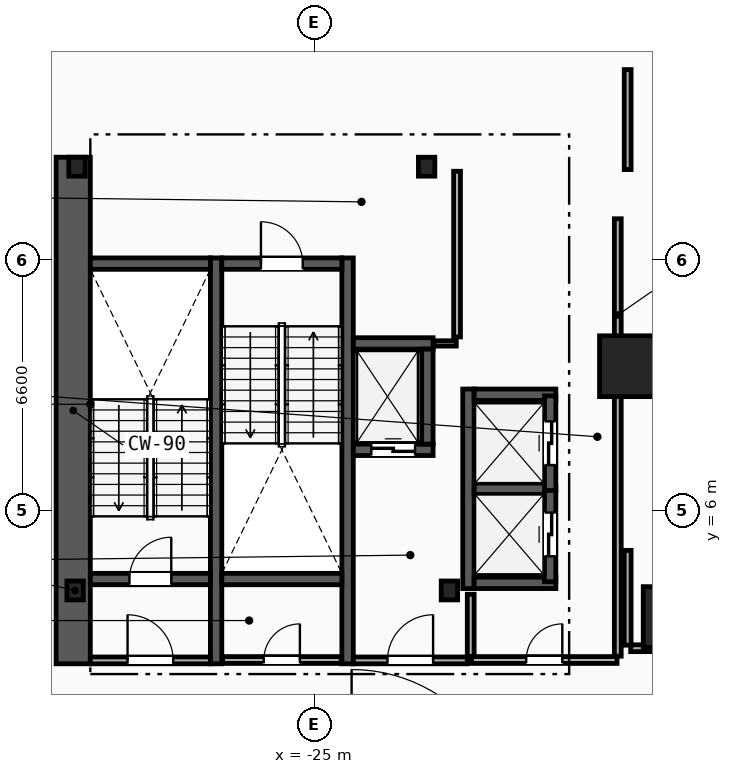
"""IFC4 building model, lengths in metres.
Left out: names, types, materials, properties, quantities, classifications, styles, units other than length and angle.
Written with IfcOpenShell. Run it as: python <this file> out.ifc"""

import sys

from ifc_helpers import new_model, si_unit, direction, frame, frame_2d, origin, origin_2d, place, context, subcontext, project, spatial, rectangle, i_section, extrude, element, fill, save


model = new_model("IFC4")
c1 = context("Model", 3, precision=1e-05, world=origin(), true_north=direction((0.0, 1.0)))
c2 = subcontext(c1, "Body", "Model", "MODEL_VIEW")
j1 = project(units=[si_unit("LENGTHUNIT", "METRE"), si_unit("PLANEANGLEUNIT", "RADIAN")], contexts=[c1])
p1 = place(None, origin())
s1 = spatial("IfcSite", under=j1, at=p1, CompositionType="ELEMENT")
p2 = place(p1, origin())
s2 = spatial("IfcBuilding", under=s1, at=p2, CompositionType="ELEMENT")
p3 = place(p2, frame((0.0, 0.0, -4.5)))
s3 = spatial("IfcBuildingStorey", under=s2, at=p3, CompositionType="ELEMENT", Elevation=-4.5)
for number, where, z_axis, x_axis in (
    (1, (-31.3, 3.9, 0.0), (0.0, 0.0, 1.0), (1.0, 0.0, 0.0)),
    (2, (-21.45, 3.9, 0.0), (0.0, 0.0, 1.0), (1.0, 0.0, 0.0)),
    (3, (-22.05, 15.05, 0.0), (0.0, 0.0, 1.0), (1.0, 0.0, 0.0)),
    (4, (-31.25, 15.05, 0.0), (0.0, 0.0, 1.0), (1.0, 0.0, 0.0)),
):
    element("IfcColumn", number, at=place(p3, frame(where, z_axis=z_axis, x_axis=x_axis)), inside=s3, PredefinedType="COLUMN", context=c2, shape_type="SweptSolid", body=[
        extrude(i_section(OverallWidth=0.432, OverallDepth=0.498, WebThickness=0.056, FlangeThickness=0.089, FilletRadius=0.018, at=origin_2d()), origin(), (0.0, 0.0, 1.0), 4.5),
    ])
for number, where, z_axis, x_axis in (
    (5, (-15.55, 3.2, 0.0), (0.0, 0.0, 1.0), (1.0, 0.0, 0.0)),
    (6, (-16.7, 9.8, 0.0), (0.0, 0.0, 1.0), (1.0, 0.0, 0.0)),
):
    element("IfcColumn", number, at=place(p3, frame(where, z_axis=z_axis, x_axis=x_axis)), inside=s3, PredefinedType="COLUMN", context=c2, shape_type="SweptSolid", body=[
        extrude(rectangle(XDim=1.6, YDim=1.6, at=origin_2d()), origin(), (0.0, 0.0, 1.0), 4.5),
    ])
p4 = place(p3, frame((-31.35, 1.97, 0.0), z_axis=(0.0, 0.0, 1.0), x_axis=(0.0, 1.0, 0.0)))
e7 = element("IfcWall", 7, at=p4, inside=s3, PredefinedType="SHEAR", context=c2, shape_type="SweptSolid", body=[
    extrude(rectangle(XDim=13.33, YDim=0.9, at=frame_2d((6.665, 0.0))), origin(), (0.0, 0.0, 1.0), 4.15),
])
for number, where, z_axis, x_axis in (
    (8, (-27.59, 1.97, 0.0), (0.0, 0.0, 1.0), (0.0, 1.0, 0.0)),
    (9, (-24.13, 1.97, 0.0), (0.0, 0.0, 1.0), (0.0, 1.0, 0.0)),
):
    element("IfcWall", number, at=place(p3, frame(where, z_axis=z_axis, x_axis=x_axis)), inside=s3, PredefinedType="SHEAR", context=c2, shape_type="SweptSolid", body=[
        extrude(rectangle(XDim=10.68, YDim=0.3, at=frame_2d((5.34, 0.0))), origin(), (0.0, 0.0, 1.0), 4.15),
    ])
p5 = place(p3, frame((-30.9, 4.2, 0.0), z_axis=(0.0, 0.0, 1.0), x_axis=(1.0, 0.0, 0.0)))
e10 = element("IfcWall", 10, at=p5, inside=s3, PredefinedType="SHEAR", context=c2, shape_type="SweptSolid", body=[
    extrude(rectangle(XDim=3.16, YDim=0.3, at=frame_2d((1.58, 0.0))), origin(), (0.0, 0.0, 1.0), 4.15),
])
p6 = place(p5, frame((1.03, 0.0, 0.0)))
e11 = element("IfcOpeningElement", 11, at=p6, cuts=e10, PredefinedType="OPENING", context=c2, shape_type="SweptSolid", body=[
    extrude(rectangle(XDim=1.1, YDim=2.15, at=frame_2d((0.55, 1.075))), frame((0.0, 0.16, 0.0), z_axis=(0.0, -1.0, 0.0), x_axis=(1.0, 0.0, 0.0)), (0.0, 0.0, 1.0), 0.32),
])
p7 = place(p3, frame((-30.9, 12.5, 0.0), z_axis=(0.0, 0.0, 1.0), x_axis=(1.0, 0.0, 0.0)))
e12 = element("IfcWall", 12, at=p7, inside=s3, PredefinedType="SHEAR", context=c2, shape_type="SweptSolid", body=[
    extrude(rectangle(XDim=3.16, YDim=0.3, at=frame_2d((1.58, 0.0))), origin(), (0.0, 0.0, 1.0), 4.15),
])
p8 = place(p3, frame((-27.44, 12.5, 0.0), z_axis=(0.0, 0.0, 1.0), x_axis=(1.0, 0.0, 0.0)))
e13 = element("IfcWall", 13, at=p8, inside=s3, PredefinedType="SHEAR", context=c2, shape_type="SweptSolid", body=[
    extrude(rectangle(XDim=3.16, YDim=0.3, at=frame_2d((1.58, 0.0))), origin(), (0.0, 0.0, 1.0), 4.15),
])
p9 = place(p8, frame((1.03, 0.0, 0.0)))
e14 = element("IfcOpeningElement", 14, at=p9, cuts=e13, PredefinedType="OPENING", context=c2, shape_type="SweptSolid", body=[
    extrude(rectangle(XDim=1.1, YDim=2.15, at=frame_2d((0.55, 1.075))), frame((0.0, 0.16, 0.0), z_axis=(0.0, -1.0, 0.0), x_axis=(1.0, 0.0, 0.0)), (0.0, 0.0, 1.0), 0.32),
])
p10 = place(p3, frame((-27.44, 4.2, 0.0), z_axis=(0.0, 0.0, 1.0), x_axis=(1.0, 0.0, 0.0)))
e15 = element("IfcWall", 15, at=p10, inside=s3, PredefinedType="SHEAR", context=c2, shape_type="SweptSolid", body=[
    extrude(rectangle(XDim=3.16, YDim=0.3, at=frame_2d((1.58, 0.0))), origin(), (0.0, 0.0, 1.0), 4.15),
])
p11 = place(p3, frame((-20.89, 2.15, 0.0), z_axis=(0.0, 0.0, 1.0), x_axis=(0.0, 1.0, 0.0)))
e16 = element("IfcWall", 16, at=p11, inside=s3, PredefinedType="PARTITIONING", context=c2, shape_type="SweptSolid", body=[
    extrude(rectangle(XDim=1.65, YDim=0.18, at=frame_2d((0.825, 0.0))), origin(), (0.0, 0.0, 1.0), 4.15),
])
p12 = place(p3, frame((-23.98, 2.06, 0.0), z_axis=(0.0, 0.0, 1.0), x_axis=(1.0, 0.0, 0.0)))
e17 = element("IfcWall", 17, at=p12, inside=s3, PredefinedType="PARTITIONING", context=c2, shape_type="SweptSolid", body=[
    extrude(rectangle(XDim=3.0, YDim=0.18, at=frame_2d((1.5, 0.0))), origin(), (0.0, 0.0, 1.0), 4.15),
])
p13 = place(p12, frame((0.9, 0.0, 0.0)))
e18 = element("IfcOpeningElement", 18, at=p13, cuts=e17, PredefinedType="OPENING", context=c2, shape_type="SweptSolid", body=[
    extrude(rectangle(XDim=1.2, YDim=2.15, at=frame_2d((0.6, 1.075))), frame((0.0, 0.1, 0.0), z_axis=(0.0, -1.0, 0.0), x_axis=(1.0, 0.0, 0.0)), (0.0, 0.0, 1.0), 0.2),
])
p14 = place(p3, frame((-30.9, 2.06, 0.0), z_axis=(0.0, 0.0, 1.0), x_axis=(1.0, 0.0, 0.0)))
e19 = element("IfcWall", 19, at=p14, inside=s3, PredefinedType="PARTITIONING", context=c2, shape_type="SweptSolid", body=[
    extrude(rectangle(XDim=3.16, YDim=0.18, at=frame_2d((1.58, 0.0))), origin(), (0.0, 0.0, 1.0), 4.15),
])
p15 = place(p14, frame((0.98, 0.0, 0.0)))
e20 = element("IfcOpeningElement", 20, at=p15, cuts=e19, PredefinedType="OPENING", context=c2, shape_type="SweptSolid", body=[
    extrude(rectangle(XDim=1.2, YDim=2.15, at=frame_2d((0.6, 1.075))), frame((0.0, 0.1, 0.0), z_axis=(0.0, -1.0, 0.0), x_axis=(1.0, 0.0, 0.0)), (0.0, 0.0, 1.0), 0.2),
])
p16 = place(p3, frame((-23.98, 7.6, 0.0), z_axis=(0.0, 0.0, 1.0), x_axis=(1.0, 0.0, 0.0)))
e21 = element("IfcWall", 21, at=p16, inside=s3, PredefinedType="SHEAR", context=c2, shape_type="SweptSolid", body=[
    extrude(rectangle(XDim=2.1, YDim=0.3, at=frame_2d((1.05, 0.0))), origin(), (0.0, 0.0, 1.0), 4.15),
])
p17 = place(p16, frame((0.475, 0.0, 0.0)))
e22 = element("IfcOpeningElement", 22, at=p17, cuts=e21, PredefinedType="OPENING", context=c2, shape_type="SweptSolid", body=[
    extrude(rectangle(XDim=1.15, YDim=2.2, at=frame_2d((0.575, 1.1))), frame((0.0, 0.16, 0.0), z_axis=(0.0, -1.0, 0.0), x_axis=(1.0, 0.0, 0.0)), (0.0, 0.0, 1.0), 0.32),
])
p18 = place(p3, frame((-23.98, 10.4, 0.0), z_axis=(0.0, 0.0, 1.0), x_axis=(1.0, 0.0, 0.0)))
e23 = element("IfcWall", 23, at=p18, inside=s3, PredefinedType="SHEAR", context=c2, shape_type="SweptSolid", body=[
    extrude(rectangle(XDim=2.1, YDim=0.3, at=frame_2d((1.05, 0.0))), origin(), (0.0, 0.0, 1.0), 4.15),
])
p19 = place(p3, frame((-22.03, 7.75, 0.0), z_axis=(0.0, 0.0, 1.0), x_axis=(0.0, 1.0, 0.0)))
e24 = element("IfcWall", 24, at=p19, inside=s3, PredefinedType="SHEAR", context=c2, shape_type="SweptSolid", body=[
    extrude(rectangle(XDim=2.5, YDim=0.3, at=frame_2d((1.25, 0.0))), origin(), (0.0, 0.0, 1.0), 4.15),
])
p20 = place(p3, frame((-20.95, 3.95, 0.0), z_axis=(0.0, 0.0, 1.0), x_axis=(0.0, 1.0, 0.0)))
e25 = element("IfcWall", 25, at=p20, inside=s3, PredefinedType="SHEAR", context=c2, shape_type="SweptSolid", body=[
    extrude(rectangle(XDim=5.25, YDim=0.3, at=frame_2d((2.625, 0.0))), origin(), (0.0, 0.0, 1.0), 4.15),
])
for number, where, z_axis, x_axis in (
    (26, (-20.8, 4.1, 0.0), (0.0, 0.0, 1.0), (1.0, 0.0, 0.0)),
    (27, (-20.8, 9.05, 0.0), (0.0, 0.0, 1.0), (1.0, 0.0, 0.0)),
):
    element("IfcWall", number, at=place(p3, frame(where, z_axis=z_axis, x_axis=x_axis)), inside=s3, PredefinedType="SHEAR", context=c2, shape_type="SweptSolid", body=[
        extrude(rectangle(XDim=2.15, YDim=0.3, at=frame_2d((1.075, 0.0))), origin(), (0.0, 0.0, 1.0), 4.15),
    ])
p21 = place(p3, frame((-20.8, 6.575, 0.0), z_axis=(0.0, 0.0, 1.0), x_axis=(1.0, 0.0, 0.0)))
e28 = element("IfcWall", 28, at=p21, inside=s3, PredefinedType="SHEAR", context=c2, shape_type="SweptSolid", body=[
    extrude(rectangle(XDim=1.85, YDim=0.3, at=frame_2d((0.925, 0.0))), origin(), (0.0, 0.0, 1.0), 4.15),
])
p22 = place(p3, frame((-18.8, 4.13, 0.0), z_axis=(0.0, 0.0, 1.0), x_axis=(0.0, 1.0, 0.0)))
e29 = element("IfcWall", 29, at=p22, inside=s3, PredefinedType="SHEAR", context=c2, shape_type="SweptSolid", body=[
    extrude(rectangle(XDim=2.49, YDim=0.3, at=frame_2d((1.245, 0.0))), origin(), (0.0, 0.0, 1.0), 4.15),
])
p23 = place(p22, frame((0.67, 0.0, 0.0)))
e30 = element("IfcOpeningElement", 30, at=p23, cuts=e29, PredefinedType="OPENING", context=c2, shape_type="SweptSolid", body=[
    extrude(rectangle(XDim=1.15, YDim=2.2, at=frame_2d((0.575, 1.1))), frame((0.0, 0.16, 0.0), z_axis=(0.0, -1.0, 0.0), x_axis=(1.0, 0.0, 0.0)), (0.0, 0.0, 1.0), 0.32),
])
p24 = place(p3, frame((-18.8, 6.53, 0.0), z_axis=(0.0, 0.0, 1.0), x_axis=(0.0, 1.0, 0.0)))
e31 = element("IfcWall", 31, at=p24, inside=s3, PredefinedType="SHEAR", context=c2, shape_type="SweptSolid", body=[
    extrude(rectangle(XDim=2.49, YDim=0.3, at=frame_2d((1.245, 0.0))), origin(), (0.0, 0.0, 1.0), 4.15),
])
p25 = place(p24, frame((0.67, 0.0, 0.0)))
e32 = element("IfcOpeningElement", 32, at=p25, cuts=e31, PredefinedType="OPENING", context=c2, shape_type="SweptSolid", body=[
    extrude(rectangle(XDim=1.15, YDim=2.2, at=frame_2d((0.575, 1.1))), frame((0.0, 0.16, 0.0), z_axis=(0.0, -1.0, 0.0), x_axis=(1.0, 0.0, 0.0)), (0.0, 0.0, 1.0), 0.32),
])
p26 = place(p3, frame((-17.02, 2.17, 0.0), z_axis=(0.0, 0.0, 1.0), x_axis=(0.0, 1.0, 0.0)))
e33 = element("IfcWall", 33, at=p26, inside=s3, PredefinedType="PARTITIONING", context=c2, shape_type="SweptSolid", body=[
    extrude(rectangle(XDim=11.51, YDim=0.18, at=frame_2d((5.755, 0.0))), origin(), (0.0, 0.0, 1.0), 4.15),
])
p27 = place(p3, frame((-20.87, 2.07, 0.0), z_axis=(0.0, 0.0, 1.0), x_axis=(1.0, 0.0, 0.0)))
e34 = element("IfcWall", 34, at=p27, inside=s3, PredefinedType="PARTITIONING", context=c2, shape_type="SweptSolid", body=[
    extrude(rectangle(XDim=3.83, YDim=0.18, at=frame_2d((1.915, 0.0))), origin(), (0.0, 0.0, 1.0), 4.15),
])
p28 = place(p27, frame((1.44, 0.0, 0.0)))
e35 = element("IfcOpeningElement", 35, at=p28, cuts=e34, PredefinedType="OPENING", context=c2, shape_type="SweptSolid", body=[
    extrude(rectangle(XDim=0.95, YDim=2.1, at=frame_2d((0.475, 1.05))), frame((0.0, 0.1, 0.0), z_axis=(0.0, -1.0, 0.0), x_axis=(1.0, 0.0, 0.0)), (0.0, 0.0, 1.0), 0.2),
])
p29 = place(p3, frame((-21.86, 10.4, 0.0), z_axis=(0.0, 0.0, 1.0), x_axis=(1.0, 0.0, 0.0)))
e36 = element("IfcWall", 36, at=p29, inside=s3, PredefinedType="PARTITIONING", context=c2, shape_type="SweptSolid", body=[
    extrude(rectangle(XDim=0.59, YDim=0.14, at=frame_2d((0.295, 0.0))), origin(), (0.0, 0.0, 1.0), 4.15),
])
p30 = place(p3, frame((-21.25, 10.57, 0.0), z_axis=(0.0, 0.0, 1.0), x_axis=(0.0, 1.0, 0.0)))
e37 = element("IfcWall", 37, at=p30, inside=s3, PredefinedType="PARTITIONING", context=c2, shape_type="SweptSolid", body=[
    extrude(rectangle(XDim=4.36, YDim=0.18, at=frame_2d((2.18, 0.0))), origin(), (0.0, 0.0, 1.0), 4.15),
])
p31 = place(p3, frame((-27.42, 2.07, 0.0), z_axis=(0.0, 0.0, 1.0), x_axis=(1.0, 0.0, 0.0)))
e38 = element("IfcWall", 38, at=p31, inside=s3, PredefinedType="PARTITIONING", context=c2, shape_type="SweptSolid", body=[
    extrude(rectangle(XDim=3.12, YDim=0.18, at=frame_2d((1.56, 0.0))), origin(), (0.0, 0.0, 1.0), 4.15),
])
p32 = place(p31, frame((1.085, 0.0, 0.0)))
e39 = element("IfcOpeningElement", 39, at=p32, cuts=e38, PredefinedType="OPENING", context=c2, shape_type="SweptSolid", body=[
    extrude(rectangle(XDim=0.95, YDim=2.1, at=frame_2d((0.475, 1.05))), frame((0.0, 0.1, 0.0), z_axis=(0.0, -1.0, 0.0), x_axis=(1.0, 0.0, 0.0)), (0.0, 0.0, 1.0), 0.2),
])
p33 = place(p3, frame((16.68, 2.38, 0.0), z_axis=(0.0, 0.0, 1.0), x_axis=(-1.0, 0.0, 0.0)))
e40 = element("IfcWall", 40, at=p33, inside=s3, PredefinedType="PARTITIONING", context=c2, shape_type="SweptSolid", body=[
    extrude(rectangle(XDim=33.36, YDim=0.18, at=frame_2d((16.68, 0.0))), origin(), (0.0, 0.0, 1.0), 3.377),
])
p34 = place(p33, frame((15.98, 0.0, 0.0)))
e41 = element("IfcOpeningElement", 41, at=p34, cuts=e40, PredefinedType="OPENING", context=c2, shape_type="SweptSolid", body=[
    extrude(rectangle(XDim=1.4, YDim=2.2, at=frame_2d((0.7, 1.1))), frame((0.0, 0.1, 0.0), z_axis=(0.0, -1.0, 0.0), x_axis=(1.0, 0.0, 0.0)), (0.0, 0.0, 1.0), 0.2),
])
p35 = place(p3, frame((-16.76, 14.975, 0.0), z_axis=(0.0, 0.0, 1.0), x_axis=(0.0, 1.0, 0.0)))
e42 = element("IfcWall", 42, at=p35, inside=s3, PredefinedType="PARTITIONING", context=c2, shape_type="SweptSolid", body=[
    extrude(rectangle(XDim=2.631, YDim=0.18, at=frame_2d((1.315, 0.0))), origin(), (0.0, 0.0, 1.0), 4.15),
])
p36 = place(p3, frame((-16.76, 2.46, 0.0), z_axis=(0.0, 0.0, 1.0), x_axis=(0.0, 1.0, 0.0)))
e43 = element("IfcWall", 43, at=p36, inside=s3, PredefinedType="PARTITIONING", context=c2, shape_type="SweptSolid", body=[
    extrude(rectangle(XDim=2.495, YDim=0.18, at=frame_2d((1.248, 0.0))), origin(), (0.0, 0.0, 1.0), 4.15),
])
p37 = place(p6, origin())
e44 = element("IfcDoor", 44, at=p37, inside=s3, OperationType="SINGLE_SWING_RIGHT", PredefinedType="DOOR", context=c2, shape_type="SweptSolid", body=[
    extrude(rectangle(XDim=1.1, YDim=2.15, at=frame_2d((0.55, 1.075))), frame((0.0, 0.025, 0.0), z_axis=(0.0, -1.0, 0.0), x_axis=(1.0, 0.0, 0.0)), (0.0, 0.0, 1.0), 0.05),
])
fill(e11, e44)
p38 = place(p9, origin())
e45 = element("IfcDoor", 45, at=p38, inside=s3, OperationType="SINGLE_SWING_LEFT", PredefinedType="DOOR", context=c2, shape_type="SweptSolid", body=[
    extrude(rectangle(XDim=1.1, YDim=2.15, at=frame_2d((0.55, 1.075))), frame((0.0, 0.025, 0.0), z_axis=(0.0, -1.0, 0.0), x_axis=(1.0, 0.0, 0.0)), (0.0, 0.0, 1.0), 0.05),
])
fill(e14, e45)
p39 = place(p13, origin())
e46 = element("IfcDoor", 46, at=p39, inside=s3, OperationType="SINGLE_SWING_RIGHT", PredefinedType="DOOR", context=c2, shape_type="SweptSolid", body=[
    extrude(rectangle(XDim=1.2, YDim=2.15, at=frame_2d((0.6, 1.075))), frame((0.0, 0.025, 0.0), z_axis=(0.0, -1.0, 0.0), x_axis=(1.0, 0.0, 0.0)), (0.0, 0.0, 1.0), 0.05),
])
fill(e18, e46)
p40 = place(p15, origin())
e47 = element("IfcDoor", 47, at=p40, inside=s3, OperationType="SINGLE_SWING_LEFT", PredefinedType="DOOR", context=c2, shape_type="SweptSolid", body=[
    extrude(rectangle(XDim=1.2, YDim=2.15, at=frame_2d((0.6, 1.075))), frame((0.0, 0.025, 0.0), z_axis=(0.0, -1.0, 0.0), x_axis=(1.0, 0.0, 0.0)), (0.0, 0.0, 1.0), 0.05),
])
fill(e20, e47)
p41 = place(p17, origin())
e48 = element("IfcDoor", 48, at=p41, inside=s3, OperationType="SLIDING_TO_LEFT", PredefinedType="TRAPDOOR", context=c2, shape_type="SweptSolid", body=[
    extrude(rectangle(XDim=1.15, YDim=2.2, at=frame_2d((0.575, 1.1))), frame((0.0, 0.025, 0.0), z_axis=(0.0, -1.0, 0.0), x_axis=(1.0, 0.0, 0.0)), (0.0, 0.0, 1.0), 0.05),
])
fill(e22, e48)
p42 = place(p23, origin())
e49 = element("IfcDoor", 49, at=p42, inside=s3, OperationType="SLIDING_TO_LEFT", PredefinedType="TRAPDOOR", context=c2, shape_type="SweptSolid", body=[
    extrude(rectangle(XDim=1.15, YDim=2.2, at=frame_2d((0.575, 1.1))), frame((0.0, 0.025, 0.0), z_axis=(0.0, -1.0, 0.0), x_axis=(1.0, 0.0, 0.0)), (0.0, 0.0, 1.0), 0.05),
])
fill(e30, e49)
p43 = place(p25, origin())
e50 = element("IfcDoor", 50, at=p43, inside=s3, OperationType="SLIDING_TO_LEFT", PredefinedType="TRAPDOOR", context=c2, shape_type="SweptSolid", body=[
    extrude(rectangle(XDim=1.15, YDim=2.2, at=frame_2d((0.575, 1.1))), frame((0.0, 0.025, 0.0), z_axis=(0.0, -1.0, 0.0), x_axis=(1.0, 0.0, 0.0)), (0.0, 0.0, 1.0), 0.05),
])
fill(e32, e50)
p44 = place(p28, origin())
e51 = element("IfcDoor", 51, at=p44, inside=s3, OperationType="SINGLE_SWING_RIGHT", PredefinedType="DOOR", context=c2, shape_type="SweptSolid", body=[
    extrude(rectangle(XDim=0.95, YDim=2.1, at=frame_2d((0.475, 1.05))), frame((0.0, 0.025, 0.0), z_axis=(0.0, -1.0, 0.0), x_axis=(1.0, 0.0, 0.0)), (0.0, 0.0, 1.0), 0.05),
])
fill(e35, e51)
p45 = place(p32, origin())
e52 = element("IfcDoor", 52, at=p45, inside=s3, OperationType="SINGLE_SWING_RIGHT", PredefinedType="DOOR", context=c2, shape_type="SweptSolid", body=[
    extrude(rectangle(XDim=0.95, YDim=2.1, at=frame_2d((0.475, 1.05))), frame((0.0, 0.025, 0.0), z_axis=(0.0, -1.0, 0.0), x_axis=(1.0, 0.0, 0.0)), (0.0, 0.0, 1.0), 0.05),
])
fill(e39, e52)
save(model, sys.argv[1])
